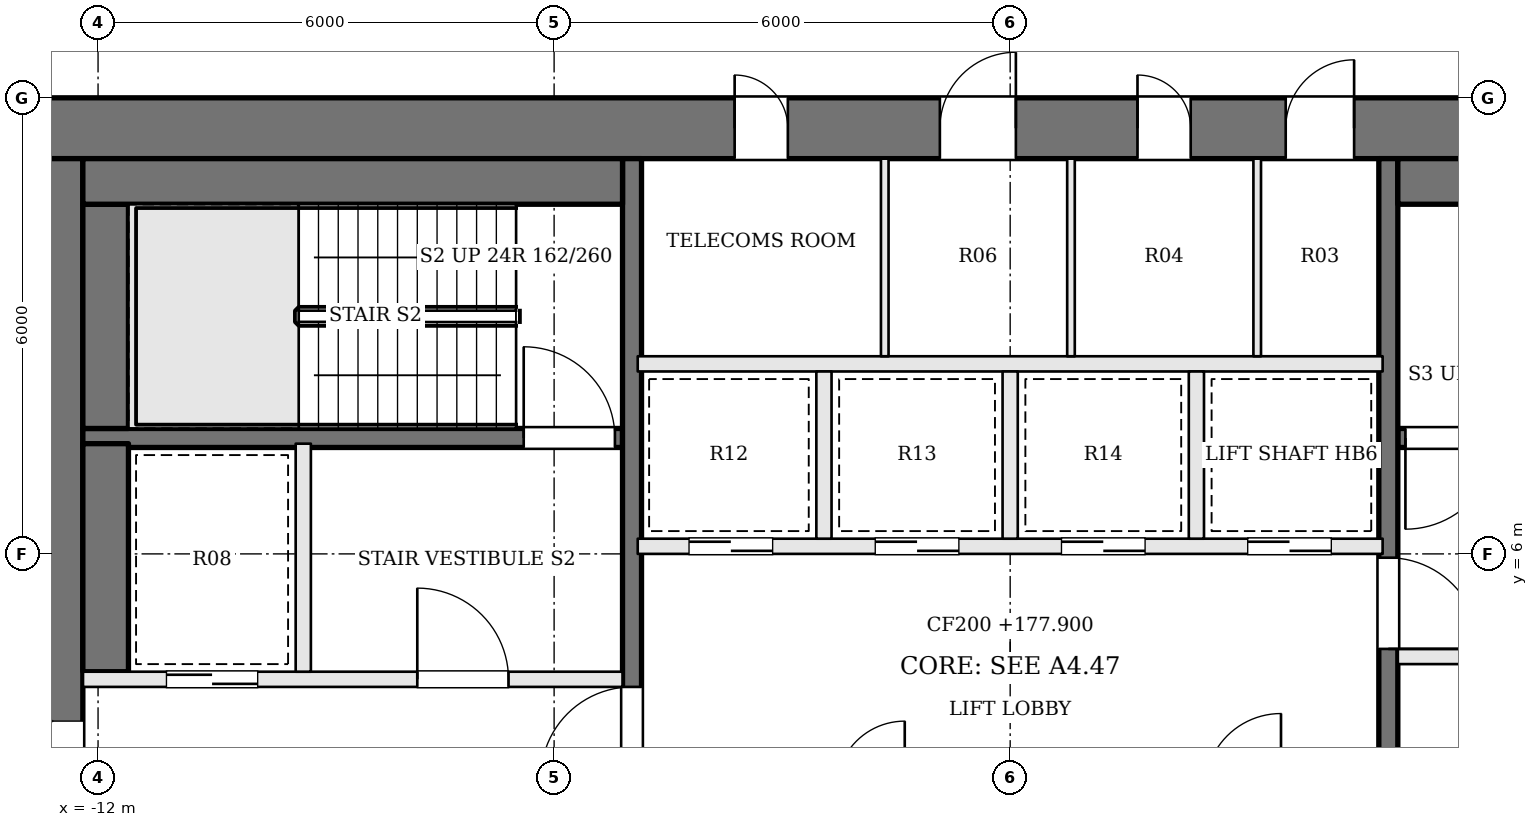
"""IFC4 building model, lengths in metres.
Left out: names, types, materials, properties, quantities, classifications, styles, units other than length and angle.
Written with IfcOpenShell. Run it as: python <this file> out.ifc"""

import sys

from ifc_helpers import new_model, si_unit, direction, frame, frame_2d, origin, place, context, subcontext, project, spatial, rectangle, extrude, element, fill, save


model = new_model("IFC4")
c1 = context("Model", 3, precision=1e-05, world=origin(), true_north=direction((0.0, 1.0)))
c2 = subcontext(c1, "Body", "Model", "MODEL_VIEW")
j1 = project(units=[si_unit("LENGTHUNIT", "METRE"), si_unit("PLANEANGLEUNIT", "RADIAN")], contexts=[c1])
p1 = place(None, origin())
s1 = spatial("IfcSite", under=j1, at=p1, CompositionType="ELEMENT")
p2 = place(p1, origin())
s2 = spatial("IfcBuilding", under=s1, at=p2, CompositionType="ELEMENT")
p3 = place(p2, frame((0.0, 0.0, 177.9)))
s3 = spatial("IfcBuildingStorey", under=s2, at=p3, CompositionType="ELEMENT", Elevation=177.9)
p4 = place(p3, frame((-13.0, 11.6, 0.0), z_axis=(0.0, 0.0, 1.0), x_axis=(1.0, 0.0, 0.0)))
e1 = element("IfcWall", 1, at=p4, inside=s3, PredefinedType="SHEAR", context=c2, shape_type="SweptSolid", body=[
    extrude(rectangle(XDim=26.0, YDim=0.8, at=frame_2d((13.0, 0.0))), origin(), (0.0, 0.0, 1.0), 3.9),
])
p5 = place(p4, frame((9.375, 0.0, 0.0)))
e2 = element("IfcOpeningElement", 2, at=p5, cuts=e1, PredefinedType="OPENING", context=c2, shape_type="SweptSolid", body=[
    extrude(rectangle(XDim=0.7, YDim=2.1, at=frame_2d((0.35, 1.05))), frame((0.0, 0.41, 0.0), z_axis=(0.0, -1.0, 0.0), x_axis=(1.0, 0.0, 0.0)), (0.0, 0.0, 1.0), 0.82),
])
p6 = place(p4, frame((12.075, 0.0, 0.0)))
e3 = element("IfcOpeningElement", 3, at=p6, cuts=e1, PredefinedType="OPENING", context=c2, shape_type="SweptSolid", body=[
    extrude(rectangle(XDim=1.0, YDim=2.1, at=frame_2d((0.5, 1.05))), frame((0.0, 0.41, 0.0), z_axis=(0.0, -1.0, 0.0), x_axis=(1.0, 0.0, 0.0)), (0.0, 0.0, 1.0), 0.82),
])
p7 = place(p4, frame((14.675, 0.0, 0.0)))
e4 = element("IfcOpeningElement", 4, at=p7, cuts=e1, PredefinedType="OPENING", context=c2, shape_type="SweptSolid", body=[
    extrude(rectangle(XDim=0.7, YDim=2.1, at=frame_2d((0.35, 1.05))), frame((0.0, 0.41, 0.0), z_axis=(0.0, -1.0, 0.0), x_axis=(1.0, 0.0, 0.0)), (0.0, 0.0, 1.0), 0.82),
])
p8 = place(p4, frame((16.625, 0.0, 0.0)))
e5 = element("IfcOpeningElement", 5, at=p8, cuts=e1, PredefinedType="OPENING", context=c2, shape_type="SweptSolid", body=[
    extrude(rectangle(XDim=0.9, YDim=2.1, at=frame_2d((0.45, 1.05))), frame((0.0, 0.41, 0.0), z_axis=(0.0, -1.0, 0.0), x_axis=(1.0, 0.0, 0.0)), (0.0, 0.0, 1.0), 0.82),
])
p9 = place(p3, frame((-12.6, -2.2, 0.0), z_axis=(0.0, 0.0, 1.0), x_axis=(0.0, 1.0, 0.0)))
e6 = element("IfcWall", 6, at=p9, inside=s3, PredefinedType="SHEAR", context=c2, shape_type="SweptSolid", body=[
    extrude(rectangle(XDim=13.4, YDim=0.8, at=frame_2d((6.7, 0.0))), origin(), (0.0, 0.0, 1.0), 3.9),
])
p10 = place(p9, frame((4.2, 0.0, 0.0)))
e7 = element("IfcOpeningElement", 7, at=p10, cuts=e6, PredefinedType="OPENING", context=c2, shape_type="SweptSolid", body=[
    extrude(rectangle(XDim=1.8, YDim=2.1, at=frame_2d((0.9, 1.05))), frame((0.0, 0.41, 0.0), z_axis=(0.0, -1.0, 0.0), x_axis=(1.0, 0.0, 0.0)), (0.0, 0.0, 1.0), 0.82),
])
p11 = place(p3, frame((12.2, 7.525, 0.0), z_axis=(0.0, 0.0, 1.0), x_axis=(-1.0, 0.0, 0.0)))
e8 = element("IfcWall", 8, at=p11, inside=s3, PredefinedType="SOLIDWALL", context=c2, shape_type="SweptSolid", body=[
    extrude(rectangle(XDim=7.1, YDim=0.25, at=frame_2d((3.55, 0.0))), origin(), (0.0, 0.0, 1.0), 3.7),
])
p12 = place(p11, frame((5.8, 0.0, 0.0)))
e9 = element("IfcOpeningElement", 9, at=p12, cuts=e8, PredefinedType="OPENING", context=c2, shape_type="SweptSolid", body=[
    extrude(rectangle(XDim=1.2, YDim=2.1, at=frame_2d((0.6, 1.05))), frame((0.0, 0.135, 0.0), z_axis=(0.0, -1.0, 0.0), x_axis=(1.0, 0.0, 0.0)), (0.0, 0.0, 1.0), 0.27),
])
p13 = place(p3, frame((-12.2, 4.35, 0.0), z_axis=(0.0, 0.0, 1.0), x_axis=(1.0, 0.0, 0.0)))
e10 = element("IfcWall", 10, at=p13, inside=s3, PredefinedType="SOLIDWALL", context=c2, shape_type="SweptSolid", body=[
    extrude(rectangle(XDim=7.1, YDim=0.2, at=frame_2d((3.55, 0.0))), origin(), (0.0, 0.0, 1.0), 3.7),
])
p14 = place(p13, frame((4.4, 0.0, 0.0)))
e11 = element("IfcOpeningElement", 11, at=p14, cuts=e10, PredefinedType="OPENING", context=c2, shape_type="SweptSolid", body=[
    extrude(rectangle(XDim=1.2, YDim=2.1, at=frame_2d((0.6, 1.05))), frame((0.0, 0.11, 0.0), z_axis=(0.0, -1.0, 0.0), x_axis=(1.0, 0.0, 0.0)), (0.0, 0.0, 1.0), 0.22),
])
p15 = place(p13, frame((1.1, 0.0, 0.0)))
e12 = element("IfcOpeningElement", 12, at=p15, cuts=e10, PredefinedType="OPENING", context=c2, shape_type="SweptSolid", body=[
    extrude(rectangle(XDim=1.2, YDim=2.1, at=frame_2d((0.6, 1.05))), frame((0.0, 0.11, 0.0), z_axis=(0.0, -1.0, 0.0), x_axis=(1.0, 0.0, 0.0)), (0.0, 0.0, 1.0), 0.22),
])
p16 = place(p3, frame((12.2, 4.65, 0.0), z_axis=(0.0, 0.0, 1.0), x_axis=(-1.0, 0.0, 0.0)))
e13 = element("IfcWall", 13, at=p16, inside=s3, PredefinedType="SOLIDWALL", context=c2, shape_type="SweptSolid", body=[
    extrude(rectangle(XDim=7.1, YDim=0.2, at=frame_2d((3.55, 0.0))), origin(), (0.0, 0.0, 1.0), 3.7),
])
p17 = place(p16, frame((4.4, 0.0, 0.0)))
e14 = element("IfcOpeningElement", 14, at=p17, cuts=e13, PredefinedType="OPENING", context=c2, shape_type="SweptSolid", body=[
    extrude(rectangle(XDim=1.2, YDim=2.1, at=frame_2d((0.6, 1.05))), frame((0.0, 0.11, 0.0), z_axis=(0.0, -1.0, 0.0), x_axis=(1.0, 0.0, 0.0)), (0.0, 0.0, 1.0), 0.22),
])
p18 = place(p16, frame((1.1, 0.0, 0.0)))
e15 = element("IfcOpeningElement", 15, at=p18, cuts=e13, PredefinedType="OPENING", context=c2, shape_type="SweptSolid", body=[
    extrude(rectangle(XDim=1.2, YDim=2.1, at=frame_2d((0.6, 1.05))), frame((0.0, 0.11, 0.0), z_axis=(0.0, -1.0, 0.0), x_axis=(1.0, 0.0, 0.0)), (0.0, 0.0, 1.0), 0.22),
])
p19 = place(p3, frame((-12.2, 7.525, 0.0), z_axis=(0.0, 0.0, 1.0), x_axis=(1.0, 0.0, 0.0)))
e16 = element("IfcWall", 16, at=p19, inside=s3, PredefinedType="SOLIDWALL", context=c2, shape_type="SweptSolid", body=[
    extrude(rectangle(XDim=7.1, YDim=0.25, at=frame_2d((3.55, 0.0))), origin(), (0.0, 0.0, 1.0), 3.7),
])
p20 = place(p19, frame((5.8, 0.0, 0.0)))
e17 = element("IfcOpeningElement", 17, at=p20, cuts=e16, PredefinedType="OPENING", context=c2, shape_type="SweptSolid", body=[
    extrude(rectangle(XDim=1.2, YDim=2.1, at=frame_2d((0.6, 1.05))), frame((0.0, 0.135, 0.0), z_axis=(0.0, -1.0, 0.0), x_axis=(1.0, 0.0, 0.0)), (0.0, 0.0, 1.0), 0.27),
])
p21 = place(p3, frame((-9.3, 4.45, 0.0), z_axis=(0.0, 0.0, 1.0), x_axis=(0.0, 1.0, 0.0)))
e18 = element("IfcWall", 18, at=p21, inside=s3, PredefinedType="SOLIDWALL", context=c2, shape_type="SweptSolid", body=[
    extrude(rectangle(XDim=3.0, YDim=0.2, at=frame_2d((1.5, 0.0))), origin(), (0.0, 0.0, 1.0), 3.7),
])
p22 = place(p3, frame((-4.975, -2.2, 0.0), z_axis=(0.0, 0.0, 1.0), x_axis=(0.0, 1.0, 0.0)))
e19 = element("IfcWall", 19, at=p22, inside=s3, PredefinedType="SOLIDWALL", context=c2, shape_type="SweptSolid", body=[
    extrude(rectangle(XDim=13.4, YDim=0.25, at=frame_2d((6.7, 0.0))), origin(), (0.0, 0.0, 1.0), 3.7),
])
p23 = place(p22, frame((5.25, 0.0, 0.0)))
e20 = element("IfcOpeningElement", 20, at=p23, cuts=e19, PredefinedType="OPENING", context=c2, shape_type="SweptSolid", body=[
    extrude(rectangle(XDim=1.2, YDim=2.1, at=frame_2d((0.6, 1.05))), frame((0.0, 0.135, 0.0), z_axis=(0.0, -1.0, 0.0), x_axis=(1.0, 0.0, 0.0)), (0.0, 0.0, 1.0), 0.27),
])
p24 = place(p3, frame((4.975, 11.2, 0.0), z_axis=(0.0, 0.0, 1.0), x_axis=(0.0, -1.0, 0.0)))
e21 = element("IfcWall", 21, at=p24, inside=s3, PredefinedType="SOLIDWALL", context=c2, shape_type="SweptSolid", body=[
    extrude(rectangle(XDim=13.4, YDim=0.25, at=frame_2d((6.7, 0.0))), origin(), (0.0, 0.0, 1.0), 3.7),
])
p25 = place(p24, frame((5.25, 0.0, 0.0)))
e22 = element("IfcOpeningElement", 22, at=p25, cuts=e21, PredefinedType="OPENING", context=c2, shape_type="SweptSolid", body=[
    extrude(rectangle(XDim=1.2, YDim=2.1, at=frame_2d((0.6, 1.05))), frame((0.0, 0.135, 0.0), z_axis=(0.0, -1.0, 0.0), x_axis=(1.0, 0.0, 0.0)), (0.0, 0.0, 1.0), 0.27),
])
p26 = place(p3, frame((-11.9, 4.45, 0.0), z_axis=(0.0, 0.0, 1.0), x_axis=(0.0, 1.0, 0.0)))
e23 = element("IfcWall", 23, at=p26, inside=s3, PredefinedType="SOLIDWALL", context=c2, shape_type="SweptSolid", body=[
    extrude(rectangle(XDim=3.0, YDim=0.6, at=frame_2d((1.5, 0.0))), origin(), (0.0, 0.0, 1.0), 3.7),
])
p27 = place(p3, frame((-11.9, 7.65, 0.0), z_axis=(0.0, 0.0, 1.0), x_axis=(0.0, 1.0, 0.0)))
e24 = element("IfcWall", 24, at=p27, inside=s3, PredefinedType="SOLIDWALL", context=c2, shape_type="SweptSolid", body=[
    extrude(rectangle(XDim=2.95, YDim=0.6, at=frame_2d((1.475, 0.0))), origin(), (0.0, 0.0, 1.0), 3.7),
])
for number, where, z_axis, x_axis in (
    (25, (-12.2, 10.9, 0.0), (0.0, 0.0, 1.0), (1.0, 0.0, 0.0)),
    (26, (12.2, 10.9, 0.0), (0.0, 0.0, 1.0), (-1.0, 0.0, 0.0)),
):
    element("IfcWall", number, at=place(p3, frame(where, z_axis=z_axis, x_axis=x_axis)), inside=s3, PredefinedType="SOLIDWALL", context=c2, shape_type="SweptSolid", body=[
        extrude(rectangle(XDim=7.1, YDim=0.6, at=frame_2d((3.55, 0.0))), origin(), (0.0, 0.0, 1.0), 3.7),
    ])
p28 = place(p3, frame((-4.9, 6.1, 0.0), z_axis=(0.0, 0.0, 1.0), x_axis=(1.0, 0.0, 0.0)))
e27 = element("IfcWall", 27, at=p28, inside=s3, PredefinedType="SOLIDWALL", context=c2, shape_type="SweptSolid", body=[
    extrude(rectangle(XDim=9.8, YDim=0.2, at=frame_2d((4.9, 0.0))), origin(), (0.0, 0.0, 1.0), 3.7),
])
p29 = place(p28, frame((0.675, 0.0, 0.0)))
e28 = element("IfcOpeningElement", 28, at=p29, cuts=e27, PredefinedType="OPENING", context=c2, shape_type="SweptSolid", body=[
    extrude(rectangle(XDim=1.1, YDim=2.1, at=frame_2d((0.55, 1.05))), frame((0.0, 0.11, 0.0), z_axis=(0.0, -1.0, 0.0), x_axis=(1.0, 0.0, 0.0)), (0.0, 0.0, 1.0), 0.22),
])
p30 = place(p28, frame((3.125, 0.0, 0.0)))
e29 = element("IfcOpeningElement", 29, at=p30, cuts=e27, PredefinedType="OPENING", context=c2, shape_type="SweptSolid", body=[
    extrude(rectangle(XDim=1.1, YDim=2.1, at=frame_2d((0.55, 1.05))), frame((0.0, 0.11, 0.0), z_axis=(0.0, -1.0, 0.0), x_axis=(1.0, 0.0, 0.0)), (0.0, 0.0, 1.0), 0.22),
])
p31 = place(p28, frame((5.575, 0.0, 0.0)))
e30 = element("IfcOpeningElement", 30, at=p31, cuts=e27, PredefinedType="OPENING", context=c2, shape_type="SweptSolid", body=[
    extrude(rectangle(XDim=1.1, YDim=2.1, at=frame_2d((0.55, 1.05))), frame((0.0, 0.11, 0.0), z_axis=(0.0, -1.0, 0.0), x_axis=(1.0, 0.0, 0.0)), (0.0, 0.0, 1.0), 0.22),
])
p32 = place(p28, frame((8.025, 0.0, 0.0)))
e31 = element("IfcOpeningElement", 31, at=p32, cuts=e27, PredefinedType="OPENING", context=c2, shape_type="SweptSolid", body=[
    extrude(rectangle(XDim=1.1, YDim=2.1, at=frame_2d((0.55, 1.05))), frame((0.0, 0.11, 0.0), z_axis=(0.0, -1.0, 0.0), x_axis=(1.0, 0.0, 0.0)), (0.0, 0.0, 1.0), 0.22),
])
p33 = place(p3, frame((-4.9, 8.5, 0.0), z_axis=(0.0, 0.0, 1.0), x_axis=(1.0, 0.0, 0.0)))
e32 = element("IfcWall", 32, at=p33, inside=s3, PredefinedType="SOLIDWALL", context=c2, shape_type="SweptSolid", body=[
    extrude(rectangle(XDim=9.8, YDim=0.2, at=frame_2d((4.9, 0.0))), origin(), (0.0, 0.0, 1.0), 3.7),
])
for number, where, z_axis, x_axis in (
    (33, (-2.45, 6.2, 0.0), (0.0, 0.0, 1.0), (0.0, 1.0, 0.0)),
    (34, (0.0, 6.2, 0.0), (0.0, 0.0, 1.0), (0.0, 1.0, 0.0)),
    (35, (2.45, 6.2, 0.0), (0.0, 0.0, 1.0), (0.0, 1.0, 0.0)),
):
    element("IfcWall", number, at=place(p3, frame(where, z_axis=z_axis, x_axis=x_axis)), inside=s3, PredefinedType="SOLIDWALL", context=c2, shape_type="SweptSolid", body=[
        extrude(rectangle(XDim=2.2, YDim=0.2, at=frame_2d((1.1, 0.0))), origin(), (0.0, 0.0, 1.0), 3.7),
    ])
for number, where, z_axis, x_axis in (
    (36, (-1.65, 8.6, 0.0), (0.0, 0.0, 1.0), (0.0, 1.0, 0.0)),
    (37, (0.8, 8.6, 0.0), (0.0, 0.0, 1.0), (0.0, 1.0, 0.0)),
    (38, (3.25, 8.6, 0.0), (0.0, 0.0, 1.0), (0.0, 1.0, 0.0)),
):
    element("IfcWall", number, at=place(p3, frame(where, z_axis=z_axis, x_axis=x_axis)), inside=s3, PredefinedType="PARTITIONING", context=c2, shape_type="SweptSolid", body=[
        extrude(rectangle(XDim=2.6, YDim=0.1, at=frame_2d((1.3, 0.0))), origin(), (0.0, 0.0, 1.0), 3.7),
    ])
p34 = place(p10, origin())
e39 = element("IfcDoor", 39, at=p34, inside=s3, OperationType="DOUBLE_DOOR_SINGLE_SWING", PredefinedType="DOOR", context=c2, shape_type="SweptSolid", body=[
    extrude(rectangle(XDim=1.8, YDim=2.1, at=frame_2d((0.9, 1.05))), frame((0.0, 0.025, 0.0), z_axis=(0.0, -1.0, 0.0), x_axis=(1.0, 0.0, 0.0)), (0.0, 0.0, 1.0), 0.05),
])
fill(e7, e39)
p35 = place(p23, origin())
e40 = element("IfcDoor", 40, at=p35, inside=s3, OperationType="SINGLE_SWING_LEFT", PredefinedType="DOOR", context=c2, shape_type="SweptSolid", body=[
    extrude(rectangle(XDim=1.2, YDim=2.1, at=frame_2d((0.6, 1.05))), frame((0.0, 0.025, 0.0), z_axis=(0.0, -1.0, 0.0), x_axis=(1.0, 0.0, 0.0)), (0.0, 0.0, 1.0), 0.05),
])
fill(e20, e40)
p36 = place(p25, origin())
e41 = element("IfcDoor", 41, at=p36, inside=s3, OperationType="SINGLE_SWING_RIGHT", PredefinedType="DOOR", context=c2, shape_type="SweptSolid", body=[
    extrude(rectangle(XDim=1.2, YDim=2.1, at=frame_2d((0.6, 1.05))), frame((0.0, 0.025, 0.0), z_axis=(0.0, -1.0, 0.0), x_axis=(1.0, 0.0, 0.0)), (0.0, 0.0, 1.0), 0.05),
])
fill(e22, e41)
p37 = place(p14, origin())
e42 = element("IfcDoor", 42, at=p37, inside=s3, OperationType="SINGLE_SWING_LEFT", PredefinedType="DOOR", context=c2, shape_type="SweptSolid", body=[
    extrude(rectangle(XDim=1.2, YDim=2.1, at=frame_2d((0.6, 1.05))), frame((0.0, 0.025, 0.0), z_axis=(0.0, -1.0, 0.0), x_axis=(1.0, 0.0, 0.0)), (0.0, 0.0, 1.0), 0.05),
])
fill(e11, e42)
p38 = place(p12, origin())
e43 = element("IfcDoor", 43, at=p38, inside=s3, OperationType="SINGLE_SWING_RIGHT", PredefinedType="DOOR", context=c2, shape_type="SweptSolid", body=[
    extrude(rectangle(XDim=1.2, YDim=2.1, at=frame_2d((0.6, 1.05))), frame((0.0, 0.025, 0.0), z_axis=(0.0, -1.0, 0.0), x_axis=(1.0, 0.0, 0.0)), (0.0, 0.0, 1.0), 0.05),
])
fill(e9, e43)
p39 = place(p20, origin())
e44 = element("IfcDoor", 44, at=p39, inside=s3, OperationType="SINGLE_SWING_LEFT", PredefinedType="DOOR", context=c2, shape_type="SweptSolid", body=[
    extrude(rectangle(XDim=1.2, YDim=2.1, at=frame_2d((0.6, 1.05))), frame((0.0, 0.025, 0.0), z_axis=(0.0, -1.0, 0.0), x_axis=(1.0, 0.0, 0.0)), (0.0, 0.0, 1.0), 0.05),
])
fill(e17, e44)
p40 = place(p15, origin())
e45 = element("IfcDoor", 45, at=p40, inside=s3, OperationType="SLIDING_TO_RIGHT", PredefinedType="DOOR", context=c2, shape_type="SweptSolid", body=[
    extrude(rectangle(XDim=1.2, YDim=2.1, at=frame_2d((0.6, 1.05))), frame((0.0, 0.025, 0.0), z_axis=(0.0, -1.0, 0.0), x_axis=(1.0, 0.0, 0.0)), (0.0, 0.0, 1.0), 0.05),
])
fill(e12, e45)
p41 = place(p29, origin())
e46 = element("IfcDoor", 46, at=p41, inside=s3, OperationType="SLIDING_TO_RIGHT", PredefinedType="DOOR", context=c2, shape_type="SweptSolid", body=[
    extrude(rectangle(XDim=1.1, YDim=2.1, at=frame_2d((0.55, 1.05))), frame((0.0, 0.025, 0.0), z_axis=(0.0, -1.0, 0.0), x_axis=(1.0, 0.0, 0.0)), (0.0, 0.0, 1.0), 0.05),
])
fill(e28, e46)
p42 = place(p30, origin())
e47 = element("IfcDoor", 47, at=p42, inside=s3, OperationType="SLIDING_TO_LEFT", PredefinedType="DOOR", context=c2, shape_type="SweptSolid", body=[
    extrude(rectangle(XDim=1.1, YDim=2.1, at=frame_2d((0.55, 1.05))), frame((0.0, 0.025, 0.0), z_axis=(0.0, -1.0, 0.0), x_axis=(1.0, 0.0, 0.0)), (0.0, 0.0, 1.0), 0.05),
])
fill(e29, e47)
p43 = place(p31, origin())
e48 = element("IfcDoor", 48, at=p43, inside=s3, OperationType="SLIDING_TO_RIGHT", PredefinedType="DOOR", context=c2, shape_type="SweptSolid", body=[
    extrude(rectangle(XDim=1.1, YDim=2.1, at=frame_2d((0.55, 1.05))), frame((0.0, 0.025, 0.0), z_axis=(0.0, -1.0, 0.0), x_axis=(1.0, 0.0, 0.0)), (0.0, 0.0, 1.0), 0.05),
])
fill(e30, e48)
p44 = place(p32, origin())
e49 = element("IfcDoor", 49, at=p44, inside=s3, OperationType="SLIDING_TO_LEFT", PredefinedType="DOOR", context=c2, shape_type="SweptSolid", body=[
    extrude(rectangle(XDim=1.1, YDim=2.1, at=frame_2d((0.55, 1.05))), frame((0.0, 0.025, 0.0), z_axis=(0.0, -1.0, 0.0), x_axis=(1.0, 0.0, 0.0)), (0.0, 0.0, 1.0), 0.05),
])
fill(e31, e49)
p45 = place(p5, origin())
e50 = element("IfcDoor", 50, at=p45, inside=s3, OperationType="SINGLE_SWING_LEFT", PredefinedType="DOOR", context=c2, shape_type="SweptSolid", body=[
    extrude(rectangle(XDim=0.7, YDim=2.1, at=frame_2d((0.35, 1.05))), frame((0.0, 0.025, 0.0), z_axis=(0.0, -1.0, 0.0), x_axis=(1.0, 0.0, 0.0)), (0.0, 0.0, 1.0), 0.05),
])
fill(e2, e50)
p46 = place(p6, origin())
e51 = element("IfcDoor", 51, at=p46, inside=s3, OperationType="SINGLE_SWING_RIGHT", PredefinedType="DOOR", context=c2, shape_type="SweptSolid", body=[
    extrude(rectangle(XDim=1.0, YDim=2.1, at=frame_2d((0.5, 1.05))), frame((0.0, 0.025, 0.0), z_axis=(0.0, -1.0, 0.0), x_axis=(1.0, 0.0, 0.0)), (0.0, 0.0, 1.0), 0.05),
])
fill(e3, e51)
p47 = place(p7, origin())
e52 = element("IfcDoor", 52, at=p47, inside=s3, OperationType="SINGLE_SWING_LEFT", PredefinedType="DOOR", context=c2, shape_type="SweptSolid", body=[
    extrude(rectangle(XDim=0.7, YDim=2.1, at=frame_2d((0.35, 1.05))), frame((0.0, 0.025, 0.0), z_axis=(0.0, -1.0, 0.0), x_axis=(1.0, 0.0, 0.0)), (0.0, 0.0, 1.0), 0.05),
])
fill(e4, e52)
p48 = place(p8, origin())
e53 = element("IfcDoor", 53, at=p48, inside=s3, OperationType="SINGLE_SWING_RIGHT", PredefinedType="DOOR", context=c2, shape_type="SweptSolid", body=[
    extrude(rectangle(XDim=0.9, YDim=2.1, at=frame_2d((0.45, 1.05))), frame((0.0, 0.025, 0.0), z_axis=(0.0, -1.0, 0.0), x_axis=(1.0, 0.0, 0.0)), (0.0, 0.0, 1.0), 0.05),
])
fill(e5, e53)
save(model, sys.argv[1])
